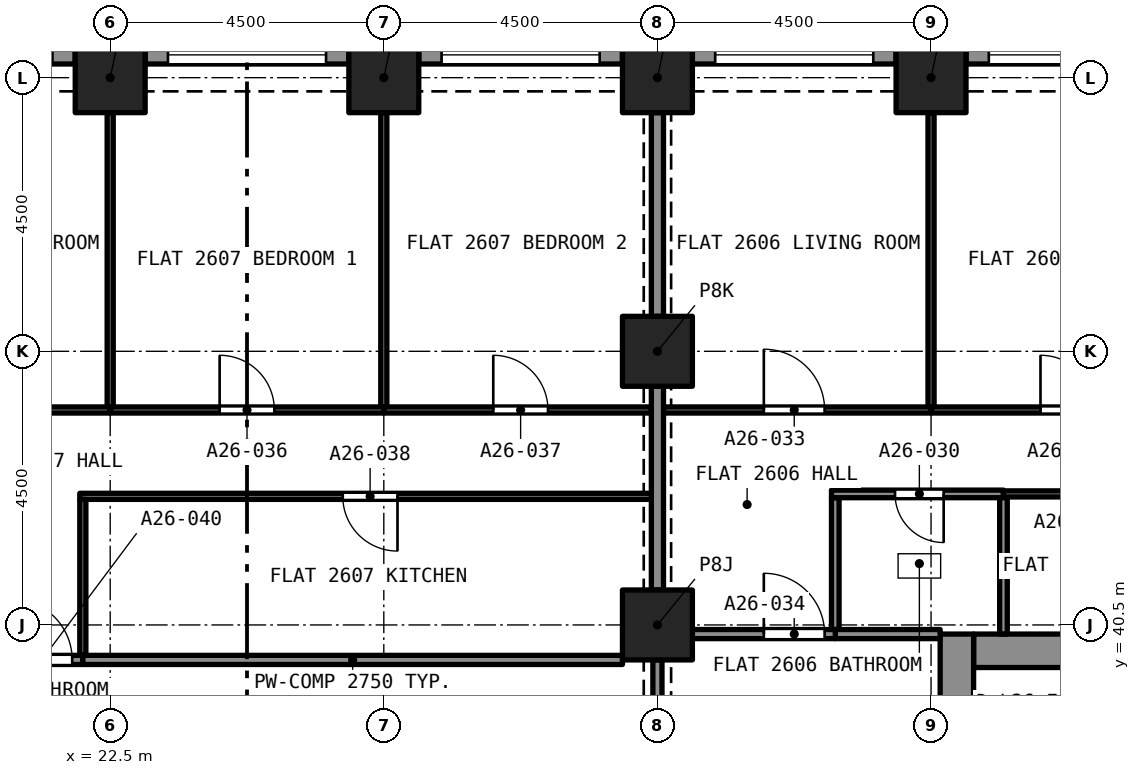
"""IFC4 building model, lengths in metres.
Left out: names, types, materials, properties, quantities, classifications, styles, units other than length and angle.
Written with IfcOpenShell. Run it as: python <this file> out.ifc"""

import sys

from ifc_helpers import new_model, si_unit, direction, frame, frame_2d, origin, origin_2d, place, context, subcontext, project, spatial, rectangle, extrude, element, fill, save


model = new_model("IFC4")
c1 = context("Model", 3, precision=1e-05, world=origin(), true_north=direction((0.0, 1.0)))
c2 = subcontext(c1, "Body", "Model", "MODEL_VIEW")
j1 = project(units=[si_unit("LENGTHUNIT", "METRE"), si_unit("PLANEANGLEUNIT", "RADIAN")], contexts=[c1])
p1 = place(None, origin())
s1 = spatial("IfcSite", under=j1, at=p1, CompositionType="ELEMENT")
p2 = place(p1, origin())
s2 = spatial("IfcBuilding", under=s1, at=p2, CompositionType="ELEMENT")
p3 = place(p2, frame((0.0, 0.0, 96.0)))
s3 = spatial("IfcBuildingStorey", under=s2, at=p3, CompositionType="ELEMENT", Elevation=96.0)
for number, where, z_axis, x_axis in (
    (1, (31.5, 40.5, 0.0), (0.0, 0.0, 1.0), (1.0, 0.0, 0.0)),
    (2, (31.5, 45.0, 0.0), (0.0, 0.0, 1.0), (1.0, 0.0, 0.0)),
    (3, (22.5, 49.5, 0.0), (0.0, 0.0, 1.0), (1.0, 0.0, 0.0)),
    (4, (27.0, 49.5, 0.0), (0.0, 0.0, 1.0), (1.0, 0.0, 0.0)),
    (5, (31.5, 49.5, 0.0), (0.0, 0.0, 1.0), (1.0, 0.0, 0.0)),
    (6, (36.0, 49.5, 0.0), (0.0, 0.0, 1.0), (1.0, 0.0, 0.0)),
):
    element("IfcColumn", number, at=place(p3, frame(where, z_axis=z_axis, x_axis=x_axis)), inside=s3, PredefinedType="COLUMN", context=c2, shape_type="SweptSolid", body=[
        extrude(rectangle(XDim=1.15, YDim=1.15, at=origin_2d()), origin(), (0.0, 0.0, 1.0), 3.2),
    ])
p4 = place(p3, frame((36.7, 40.075, 0.0), z_axis=(0.0, 0.0, 1.0), x_axis=(1.0, 0.0, 0.0)))
e7 = element("IfcWall", 7, at=p4, inside=s3, PredefinedType="SOLIDWALL", context=c2, shape_type="SweptSolid", body=[
    extrude(rectangle(XDim=7.6, YDim=0.55, at=frame_2d((3.8, 0.0))), origin(), (0.0, 0.0, 1.0), 3.2),
])
p5 = place(p3, frame((36.425, 27.15, 0.0), z_axis=(0.0, 0.0, 1.0), x_axis=(0.0, 1.0, 0.0)))
e8 = element("IfcWall", 8, at=p5, inside=s3, PredefinedType="SOLIDWALL", context=c2, shape_type="SweptSolid", body=[
    extrude(rectangle(XDim=13.2, YDim=0.55, at=frame_2d((6.6, 0.0))), origin(), (0.0, 0.0, 1.0), 3.2),
])
p6 = place(p5, frame((8.8, 0.0, 0.0)))
e9 = element("IfcOpeningElement", 9, at=p6, cuts=e8, PredefinedType="OPENING", context=c2, shape_type="SweptSolid", body=[
    extrude(rectangle(XDim=1.2, YDim=2.1, at=frame_2d((0.6, 1.05))), frame((0.0, 0.285, 0.0), z_axis=(0.0, -1.0, 0.0), x_axis=(1.0, 0.0, 0.0)), (0.0, 0.0, 1.0), 0.57),
])
p7 = place(p3, frame((36.575, 49.875, 0.0), z_axis=(0.0, 0.0, 1.0), x_axis=(1.0, 0.0, 0.0)))
e10 = element("IfcWall", 10, at=p7, inside=s3, PredefinedType="SOLIDWALL", context=c2, shape_type="SweptSolid", body=[
    extrude(rectangle(XDim=3.35, YDim=0.3, at=frame_2d((1.675, 0.0))), origin(), (0.0, 0.0, 1.0), 3.2),
])
p8 = place(p7, frame((0.375, 0.0, 0.45)))
e11 = element("IfcOpeningElement", 11, at=p8, cuts=e10, PredefinedType="OPENING", context=c2, shape_type="SweptSolid", body=[
    extrude(rectangle(XDim=2.6, YDim=1.95, at=frame_2d((1.3, 0.975))), frame((0.0, 0.16, 0.0), z_axis=(0.0, -1.0, 0.0), x_axis=(1.0, 0.0, 0.0)), (0.0, 0.0, 1.0), 0.32),
])
p9 = place(p3, frame((32.075, 49.875, 0.0), z_axis=(0.0, 0.0, 1.0), x_axis=(1.0, 0.0, 0.0)))
e12 = element("IfcWall", 12, at=p9, inside=s3, PredefinedType="SOLIDWALL", context=c2, shape_type="SweptSolid", body=[
    extrude(rectangle(XDim=3.35, YDim=0.3, at=frame_2d((1.675, 0.0))), origin(), (0.0, 0.0, 1.0), 3.2),
])
p10 = place(p9, frame((0.375, 0.0, 0.45)))
e13 = element("IfcOpeningElement", 13, at=p10, cuts=e12, PredefinedType="OPENING", context=c2, shape_type="SweptSolid", body=[
    extrude(rectangle(XDim=2.6, YDim=1.95, at=frame_2d((1.3, 0.975))), frame((0.0, 0.16, 0.0), z_axis=(0.0, -1.0, 0.0), x_axis=(1.0, 0.0, 0.0)), (0.0, 0.0, 1.0), 0.32),
])
p11 = place(p3, frame((27.575, 49.875, 0.0), z_axis=(0.0, 0.0, 1.0), x_axis=(1.0, 0.0, 0.0)))
e14 = element("IfcWall", 14, at=p11, inside=s3, PredefinedType="SOLIDWALL", context=c2, shape_type="SweptSolid", body=[
    extrude(rectangle(XDim=3.35, YDim=0.3, at=frame_2d((1.675, 0.0))), origin(), (0.0, 0.0, 1.0), 3.2),
])
p12 = place(p11, frame((0.375, 0.0, 0.45)))
e15 = element("IfcOpeningElement", 15, at=p12, cuts=e14, PredefinedType="OPENING", context=c2, shape_type="SweptSolid", body=[
    extrude(rectangle(XDim=2.6, YDim=1.95, at=frame_2d((1.3, 0.975))), frame((0.0, 0.16, 0.0), z_axis=(0.0, -1.0, 0.0), x_axis=(1.0, 0.0, 0.0)), (0.0, 0.0, 1.0), 0.32),
])
p13 = place(p3, frame((23.075, 49.875, 0.0), z_axis=(0.0, 0.0, 1.0), x_axis=(1.0, 0.0, 0.0)))
e16 = element("IfcWall", 16, at=p13, inside=s3, PredefinedType="SOLIDWALL", context=c2, shape_type="SweptSolid", body=[
    extrude(rectangle(XDim=3.35, YDim=0.3, at=frame_2d((1.675, 0.0))), origin(), (0.0, 0.0, 1.0), 3.2),
])
p14 = place(p13, frame((0.375, 0.0, 0.45)))
e17 = element("IfcOpeningElement", 17, at=p14, cuts=e16, PredefinedType="OPENING", context=c2, shape_type="SweptSolid", body=[
    extrude(rectangle(XDim=2.6, YDim=1.95, at=frame_2d((1.3, 0.975))), frame((0.0, 0.16, 0.0), z_axis=(0.0, -1.0, 0.0), x_axis=(1.0, 0.0, 0.0)), (0.0, 0.0, 1.0), 0.32),
])
p15 = place(p3, frame((18.575, 49.875, 0.0), z_axis=(0.0, 0.0, 1.0), x_axis=(1.0, 0.0, 0.0)))
e18 = element("IfcWall", 18, at=p15, inside=s3, PredefinedType="SOLIDWALL", context=c2, shape_type="SweptSolid", body=[
    extrude(rectangle(XDim=3.35, YDim=0.3, at=frame_2d((1.675, 0.0))), origin(), (0.0, 0.0, 1.0), 3.2),
])
p16 = place(p15, frame((0.375, 0.0, 0.45)))
e19 = element("IfcOpeningElement", 19, at=p16, cuts=e18, PredefinedType="OPENING", context=c2, shape_type="SweptSolid", body=[
    extrude(rectangle(XDim=2.6, YDim=1.95, at=frame_2d((1.3, 0.975))), frame((0.0, 0.16, 0.0), z_axis=(0.0, -1.0, 0.0), x_axis=(1.0, 0.0, 0.0)), (0.0, 0.0, 1.0), 0.32),
])
p17 = place(p3, frame((34.425, 40.425, 0.0), z_axis=(0.0, 0.0, 1.0), x_axis=(0.0, 1.0, 0.0)))
e20 = element("IfcWall", 20, at=p17, inside=s3, PredefinedType="PARTITIONING", context=c2, shape_type="SweptSolid", body=[
    extrude(rectangle(XDim=2.167, YDim=0.125, at=frame_2d((1.084, 0.0))), origin(), (0.0, 0.0, 1.0), 2.9),
])
p18 = place(p3, frame((37.19, 42.655, 0.0), z_axis=(0.0, 0.0, 1.0), x_axis=(-1.0, 0.0, 0.0)))
e21 = element("IfcWall", 21, at=p18, inside=s3, PredefinedType="PARTITIONING", context=c2, shape_type="SweptSolid", body=[
    extrude(rectangle(XDim=2.828, YDim=0.125, at=frame_2d((1.414, 0.0))), origin(), (0.0, 0.0, 1.0), 2.9),
])
p19 = place(p18, frame((0.983, 0.0, 0.0)))
e22 = element("IfcOpeningElement", 22, at=p19, cuts=e21, PredefinedType="OPENING", context=c2, shape_type="SweptSolid", body=[
    extrude(rectangle(XDim=0.8, YDim=2.1, at=frame_2d((0.4, 1.05))), frame((0.0, 0.073, 0.0), z_axis=(0.0, -1.0, 0.0), x_axis=(1.0, 0.0, 0.0)), (0.0, 0.0, 1.0), 0.145),
])
p20 = place(p3, frame((37.191, 40.35, 0.0), z_axis=(0.0, 0.0, 1.0), x_axis=(0.0, 1.0, 0.0)))
e23 = element("IfcWall", 23, at=p20, inside=s3, PredefinedType="PARTITIONING", context=c2, shape_type="SweptSolid", body=[
    extrude(rectangle(XDim=2.242, YDim=0.125, at=frame_2d((1.121, 0.0))), origin(), (0.0, 0.0, 1.0), 2.9),
])
p21 = place(p3, frame((34.425, 40.35, 0.0), z_axis=(0.0, 0.0, 1.0), x_axis=(1.0, 0.0, 0.0)))
e24 = element("IfcWall", 24, at=p21, inside=s3, PredefinedType="PARTITIONING", context=c2, shape_type="SweptSolid", body=[
    extrude(rectangle(XDim=1.725, YDim=0.15, at=frame_2d((0.862, 0.0))), origin(), (0.0, 0.0, 1.0), 2.9),
])
p22 = place(p3, frame((36.0, 44.035, 0.0), z_axis=(0.0, 0.0, 1.0), x_axis=(1.0, 0.0, 0.0)))
e25 = element("IfcWall", 25, at=p22, inside=s3, PredefinedType="PARTITIONING", context=c2, shape_type="SweptSolid", body=[
    extrude(rectangle(XDim=4.4, YDim=0.1, at=frame_2d((2.2, 0.0))), origin(), (0.0, 0.0, 1.0), 2.9),
])
p23 = place(p22, frame((1.8, 0.0, 0.0)))
e26 = element("IfcOpeningElement", 26, at=p23, cuts=e25, PredefinedType="OPENING", context=c2, shape_type="SweptSolid", body=[
    extrude(rectangle(XDim=0.9, YDim=2.1, at=frame_2d((0.45, 1.05))), frame((0.0, 0.06, 0.0), z_axis=(0.0, -1.0, 0.0), x_axis=(1.0, 0.0, 0.0)), (0.0, 0.0, 1.0), 0.12),
])
p24 = place(p3, frame((36.0, 44.085, 0.0), z_axis=(0.0, 0.0, 1.0), x_axis=(0.0, 1.0, 0.0)))
e27 = element("IfcWall", 27, at=p24, inside=s3, PredefinedType="PARTITIONING", context=c2, shape_type="SweptSolid", body=[
    extrude(rectangle(XDim=4.84, YDim=0.1, at=frame_2d((2.42, 0.0))), origin(), (0.0, 0.0, 1.0), 2.9),
])
p25 = place(p3, frame((40.4, 42.655, 0.0), z_axis=(0.0, 0.0, 1.0), x_axis=(-1.0, 0.0, 0.0)))
e28 = element("IfcWall", 28, at=p25, inside=s3, PredefinedType="PARTITIONING", context=c2, shape_type="SweptSolid", body=[
    extrude(rectangle(XDim=3.209, YDim=0.1, at=frame_2d((1.605, 0.0))), origin(), (0.0, 0.0, 1.0), 2.9),
])
p26 = place(p25, frame((1.105, 0.0, 0.0)))
e29 = element("IfcOpeningElement", 29, at=p26, cuts=e28, PredefinedType="OPENING", context=c2, shape_type="SweptSolid", body=[
    extrude(rectangle(XDim=0.9, YDim=2.1, at=frame_2d((0.45, 1.05))), frame((0.0, 0.06, 0.0), z_axis=(0.0, -1.0, 0.0), x_axis=(1.0, 0.0, 0.0)), (0.0, 0.0, 1.0), 0.12),
])
p27 = place(p3, frame((31.6, 44.035, 0.0), z_axis=(0.0, 0.0, 1.0), x_axis=(1.0, 0.0, 0.0)))
e30 = element("IfcWall", 30, at=p27, inside=s3, PredefinedType="PARTITIONING", context=c2, shape_type="SweptSolid", body=[
    extrude(rectangle(XDim=4.4, YDim=0.1, at=frame_2d((2.2, 0.0))), origin(), (0.0, 0.0, 1.0), 2.9),
])
p28 = place(p27, frame((1.65, 0.0, 0.0)))
e31 = element("IfcOpeningElement", 31, at=p28, cuts=e30, PredefinedType="OPENING", context=c2, shape_type="SweptSolid", body=[
    extrude(rectangle(XDim=1.0, YDim=2.1, at=frame_2d((0.5, 1.05))), frame((0.0, 0.06, 0.0), z_axis=(0.0, -1.0, 0.0), x_axis=(1.0, 0.0, 0.0)), (0.0, 0.0, 1.0), 0.12),
])
p29 = place(p3, frame((31.5, 41.075, 0.0), z_axis=(0.0, 0.0, 1.0), x_axis=(0.0, 1.0, 0.0)))
e32 = element("IfcWall", 32, at=p29, inside=s3, PredefinedType="PARTITIONING", context=c2, shape_type="SweptSolid", body=[
    extrude(rectangle(XDim=3.35, YDim=0.2, at=frame_2d((1.675, 0.0))), origin(), (0.0, 0.0, 1.0), 2.38),
])
p30 = place(p3, frame((32.075, 40.35, 0.0), z_axis=(0.0, 0.0, 1.0), x_axis=(1.0, 0.0, 0.0)))
e33 = element("IfcWall", 33, at=p30, inside=s3, PredefinedType="PARTITIONING", context=c2, shape_type="SweptSolid", body=[
    extrude(rectangle(XDim=2.35, YDim=0.15, at=frame_2d((1.175, 0.0))), origin(), (0.0, 0.0, 1.0), 2.9),
])
p31 = place(p30, frame((1.175, 0.0, 0.0)))
e34 = element("IfcOpeningElement", 34, at=p31, cuts=e33, PredefinedType="OPENING", context=c2, shape_type="SweptSolid", body=[
    extrude(rectangle(XDim=1.0, YDim=2.1, at=frame_2d((0.5, 1.05))), frame((0.0, 0.085, 0.0), z_axis=(0.0, -1.0, 0.0), x_axis=(1.0, 0.0, 0.0)), (0.0, 0.0, 1.0), 0.17),
])
p32 = place(p3, frame((31.5, 45.575, 0.0), z_axis=(0.0, 0.0, 1.0), x_axis=(0.0, 1.0, 0.0)))
e35 = element("IfcWall", 35, at=p32, inside=s3, PredefinedType="PARTITIONING", context=c2, shape_type="SweptSolid", body=[
    extrude(rectangle(XDim=3.35, YDim=0.2, at=frame_2d((1.675, 0.0))), origin(), (0.0, 0.0, 1.0), 2.38),
])
p33 = place(p3, frame((27.0, 44.085, 0.0), z_axis=(0.0, 0.0, 1.0), x_axis=(0.0, 1.0, 0.0)))
e36 = element("IfcWall", 36, at=p33, inside=s3, PredefinedType="PARTITIONING", context=c2, shape_type="SweptSolid", body=[
    extrude(rectangle(XDim=4.84, YDim=0.1, at=frame_2d((2.42, 0.0))), origin(), (0.0, 0.0, 1.0), 2.75),
])
p34 = place(p3, frame((22.5, 44.035, 0.0), z_axis=(0.0, 0.0, 1.0), x_axis=(1.0, 0.0, 0.0)))
e37 = element("IfcWall", 37, at=p34, inside=s3, PredefinedType="PARTITIONING", context=c2, shape_type="SweptSolid", body=[
    extrude(rectangle(XDim=4.5, YDim=0.1, at=frame_2d((2.25, 0.0))), origin(), (0.0, 0.0, 1.0), 2.75),
])
p35 = place(p34, frame((1.8, 0.0, 0.0)))
e38 = element("IfcOpeningElement", 38, at=p35, cuts=e37, PredefinedType="OPENING", context=c2, shape_type="SweptSolid", body=[
    extrude(rectangle(XDim=0.9, YDim=2.1, at=frame_2d((0.45, 1.05))), frame((0.0, 0.06, 0.0), z_axis=(0.0, -1.0, 0.0), x_axis=(1.0, 0.0, 0.0)), (0.0, 0.0, 1.0), 0.12),
])
p36 = place(p3, frame((22.5, 44.085, 0.0), z_axis=(0.0, 0.0, 1.0), x_axis=(0.0, 1.0, 0.0)))
e39 = element("IfcWall", 39, at=p36, inside=s3, PredefinedType="PARTITIONING", context=c2, shape_type="SweptSolid", body=[
    extrude(rectangle(XDim=4.84, YDim=0.1, at=frame_2d((2.42, 0.0))), origin(), (0.0, 0.0, 1.0), 2.75),
])
p37 = place(p3, frame((27.0, 44.035, 0.0), z_axis=(0.0, 0.0, 1.0), x_axis=(1.0, 0.0, 0.0)))
e40 = element("IfcWall", 40, at=p37, inside=s3, PredefinedType="PARTITIONING", context=c2, shape_type="SweptSolid", body=[
    extrude(rectangle(XDim=4.4, YDim=0.1, at=frame_2d((2.2, 0.0))), origin(), (0.0, 0.0, 1.0), 2.75),
])
p38 = place(p37, frame((1.8, 0.0, 0.0)))
e41 = element("IfcOpeningElement", 41, at=p38, cuts=e40, PredefinedType="OPENING", context=c2, shape_type="SweptSolid", body=[
    extrude(rectangle(XDim=0.9, YDim=2.1, at=frame_2d((0.45, 1.05))), frame((0.0, 0.06, 0.0), z_axis=(0.0, -1.0, 0.0), x_axis=(1.0, 0.0, 0.0)), (0.0, 0.0, 1.0), 0.12),
])
p39 = place(p3, frame((31.4, 42.615, 0.0), z_axis=(0.0, 0.0, 1.0), x_axis=(-1.0, 0.0, 0.0)))
e42 = element("IfcWall", 42, at=p39, inside=s3, PredefinedType="PARTITIONING", context=c2, shape_type="SweptSolid", body=[
    extrude(rectangle(XDim=9.4, YDim=0.1, at=frame_2d((4.7, 0.0))), origin(), (0.0, 0.0, 1.0), 2.75),
])
p40 = place(p39, frame((4.175, 0.0, 0.0)))
e43 = element("IfcOpeningElement", 43, at=p40, cuts=e42, PredefinedType="OPENING", context=c2, shape_type="SweptSolid", body=[
    extrude(rectangle(XDim=0.9, YDim=2.1, at=frame_2d((0.45, 1.05))), frame((0.0, 0.06, 0.0), z_axis=(0.0, -1.0, 0.0), x_axis=(1.0, 0.0, 0.0)), (0.0, 0.0, 1.0), 0.12),
])
p41 = place(p3, frame((22.05, 40.0, 0.0), z_axis=(0.0, 0.0, 1.0), x_axis=(0.0, 1.0, 0.0)))
e44 = element("IfcWall", 44, at=p41, inside=s3, PredefinedType="PARTITIONING", context=c2, shape_type="SweptSolid", body=[
    extrude(rectangle(XDim=2.565, YDim=0.1, at=frame_2d((1.282, 0.0))), origin(), (0.0, 0.0, 1.0), 2.75),
])
p42 = place(p3, frame((18.1, 44.035, 0.0), z_axis=(0.0, 0.0, 1.0), x_axis=(1.0, 0.0, 0.0)))
e45 = element("IfcWall", 45, at=p42, inside=s3, PredefinedType="PARTITIONING", context=c2, shape_type="SweptSolid", body=[
    extrude(rectangle(XDim=4.4, YDim=0.1, at=frame_2d((2.2, 0.0))), origin(), (0.0, 0.0, 1.0), 2.75),
])
p43 = place(p42, frame((1.65, 0.0, 0.0)))
e46 = element("IfcOpeningElement", 46, at=p43, cuts=e45, PredefinedType="OPENING", context=c2, shape_type="SweptSolid", body=[
    extrude(rectangle(XDim=1.0, YDim=2.1, at=frame_2d((0.5, 1.05))), frame((0.0, 0.06, 0.0), z_axis=(0.0, -1.0, 0.0), x_axis=(1.0, 0.0, 0.0)), (0.0, 0.0, 1.0), 0.12),
])
p44 = place(p3, frame((20.7, 39.925, 0.0), z_axis=(0.0, 0.0, 1.0), x_axis=(1.0, 0.0, 0.0)))
e47 = element("IfcWall", 47, at=p44, inside=s3, PredefinedType="PARTITIONING", context=c2, shape_type="SweptSolid", body=[
    extrude(rectangle(XDim=1.35, YDim=0.15, at=frame_2d((0.675, 0.0))), origin(), (0.0, 0.0, 1.0), 2.75),
])
p45 = place(p44, frame((0.175, 0.0, 0.0)))
e48 = element("IfcOpeningElement", 48, at=p45, cuts=e47, PredefinedType="OPENING", context=c2, shape_type="SweptSolid", body=[
    extrude(rectangle(XDim=1.0, YDim=2.1, at=frame_2d((0.5, 1.05))), frame((0.0, 0.085, 0.0), z_axis=(0.0, -1.0, 0.0), x_axis=(1.0, 0.0, 0.0)), (0.0, 0.0, 1.0), 0.17),
])
p46 = place(p3, frame((22.05, 39.925, 0.0), z_axis=(0.0, 0.0, 1.0), x_axis=(1.0, 0.0, 0.0)))
e49 = element("IfcWall", 49, at=p46, inside=s3, PredefinedType="PARTITIONING", context=c2, shape_type="SweptSolid", body=[
    extrude(rectangle(XDim=8.875, YDim=0.15, at=frame_2d((4.438, 0.0))), origin(), (0.0, 0.0, 1.0), 2.75),
])
p47 = place(p3, frame((31.5, 36.575, 0.0), z_axis=(0.0, 0.0, 1.0), x_axis=(0.0, 1.0, 0.0)))
e50 = element("IfcWall", 50, at=p47, inside=s3, PredefinedType="PARTITIONING", context=c2, shape_type="SweptSolid", body=[
    extrude(rectangle(XDim=3.35, YDim=0.15, at=frame_2d((1.675, 0.0))), origin(), (0.0, 0.0, 1.0), 2.38),
])
p48 = place(p47, frame((1.075, 0.0, 0.0)))
e51 = element("IfcOpeningElement", 51, at=p48, cuts=e50, PredefinedType="OPENING", context=c2, shape_type="SweptSolid", body=[
    extrude(rectangle(XDim=1.2, YDim=2.1, at=frame_2d((0.6, 1.05))), frame((0.0, 0.085, 0.0), z_axis=(0.0, -1.0, 0.0), x_axis=(1.0, 0.0, 0.0)), (0.0, 0.0, 1.0), 0.17),
])
p49 = place(p8, origin())
e52 = element("IfcWindow", 52, at=p49, inside=s3, PartitioningType="SINGLE_PANEL", PredefinedType="WINDOW", context=c2, shape_type="SweptSolid", body=[
    extrude(rectangle(XDim=2.6, YDim=1.95, at=frame_2d((1.3, 0.975))), frame((0.0, 0.03, 0.0), z_axis=(0.0, -1.0, 0.0), x_axis=(1.0, 0.0, 0.0)), (0.0, 0.0, 1.0), 0.06),
])
fill(e11, e52)
p50 = place(p10, origin())
e53 = element("IfcWindow", 53, at=p50, inside=s3, PartitioningType="SINGLE_PANEL", PredefinedType="WINDOW", context=c2, shape_type="SweptSolid", body=[
    extrude(rectangle(XDim=2.6, YDim=1.95, at=frame_2d((1.3, 0.975))), frame((0.0, 0.03, 0.0), z_axis=(0.0, -1.0, 0.0), x_axis=(1.0, 0.0, 0.0)), (0.0, 0.0, 1.0), 0.06),
])
fill(e13, e53)
p51 = place(p12, origin())
e54 = element("IfcWindow", 54, at=p51, inside=s3, PartitioningType="SINGLE_PANEL", PredefinedType="WINDOW", context=c2, shape_type="SweptSolid", body=[
    extrude(rectangle(XDim=2.6, YDim=1.95, at=frame_2d((1.3, 0.975))), frame((0.0, 0.03, 0.0), z_axis=(0.0, -1.0, 0.0), x_axis=(1.0, 0.0, 0.0)), (0.0, 0.0, 1.0), 0.06),
])
fill(e15, e54)
p52 = place(p14, origin())
e55 = element("IfcWindow", 55, at=p52, inside=s3, PartitioningType="SINGLE_PANEL", PredefinedType="WINDOW", context=c2, shape_type="SweptSolid", body=[
    extrude(rectangle(XDim=2.6, YDim=1.95, at=frame_2d((1.3, 0.975))), frame((0.0, 0.03, 0.0), z_axis=(0.0, -1.0, 0.0), x_axis=(1.0, 0.0, 0.0)), (0.0, 0.0, 1.0), 0.06),
])
fill(e17, e55)
p53 = place(p19, origin())
e56 = element("IfcDoor", 56, at=p53, inside=s3, OperationType="SINGLE_SWING_LEFT", PredefinedType="DOOR", context=c2, shape_type="SweptSolid", body=[
    extrude(rectangle(XDim=0.8, YDim=2.1, at=frame_2d((0.4, 1.05))), frame((0.0, 0.025, 0.0), z_axis=(0.0, -1.0, 0.0), x_axis=(1.0, 0.0, 0.0)), (0.0, 0.0, 1.0), 0.05),
])
fill(e22, e56)
p54 = place(p23, origin())
e57 = element("IfcDoor", 57, at=p54, inside=s3, OperationType="SINGLE_SWING_RIGHT", PredefinedType="DOOR", context=c2, shape_type="SweptSolid", body=[
    extrude(rectangle(XDim=0.9, YDim=2.1, at=frame_2d((0.45, 1.05))), frame((0.0, 0.025, 0.0), z_axis=(0.0, -1.0, 0.0), x_axis=(1.0, 0.0, 0.0)), (0.0, 0.0, 1.0), 0.05),
])
fill(e26, e57)
p55 = place(p28, origin())
e58 = element("IfcDoor", 58, at=p55, inside=s3, OperationType="SINGLE_SWING_LEFT", PredefinedType="DOOR", context=c2, shape_type="SweptSolid", body=[
    extrude(rectangle(XDim=1.0, YDim=2.1, at=frame_2d((0.5, 1.05))), frame((0.0, 0.025, 0.0), z_axis=(0.0, -1.0, 0.0), x_axis=(1.0, 0.0, 0.0)), (0.0, 0.0, 1.0), 0.05),
])
fill(e31, e58)
p56 = place(p31, origin())
e59 = element("IfcDoor", 59, at=p56, inside=s3, OperationType="SINGLE_SWING_RIGHT", PredefinedType="DOOR", context=c2, shape_type="SweptSolid", body=[
    extrude(rectangle(XDim=1.0, YDim=2.1, at=frame_2d((0.5, 1.05))), frame((0.0, 0.025, 0.0), z_axis=(0.0, -1.0, 0.0), x_axis=(1.0, 0.0, 0.0)), (0.0, 0.0, 1.0), 0.05),
])
fill(e34, e59)
p57 = place(p35, origin())
e60 = element("IfcDoor", 60, at=p57, inside=s3, OperationType="SINGLE_SWING_LEFT", PredefinedType="DOOR", context=c2, shape_type="SweptSolid", body=[
    extrude(rectangle(XDim=0.9, YDim=2.1, at=frame_2d((0.45, 1.05))), frame((0.0, 0.025, 0.0), z_axis=(0.0, -1.0, 0.0), x_axis=(1.0, 0.0, 0.0)), (0.0, 0.0, 1.0), 0.05),
])
fill(e38, e60)
p58 = place(p38, origin())
e61 = element("IfcDoor", 61, at=p58, inside=s3, OperationType="SINGLE_SWING_RIGHT", PredefinedType="DOOR", context=c2, shape_type="SweptSolid", body=[
    extrude(rectangle(XDim=0.9, YDim=2.1, at=frame_2d((0.45, 1.05))), frame((0.0, 0.025, 0.0), z_axis=(0.0, -1.0, 0.0), x_axis=(1.0, 0.0, 0.0)), (0.0, 0.0, 1.0), 0.05),
])
fill(e41, e61)
p59 = place(p40, origin())
e62 = element("IfcDoor", 62, at=p59, inside=s3, OperationType="SINGLE_SWING_LEFT", PredefinedType="DOOR", context=c2, shape_type="SweptSolid", body=[
    extrude(rectangle(XDim=0.9, YDim=2.1, at=frame_2d((0.45, 1.05))), frame((0.0, 0.025, 0.0), z_axis=(0.0, -1.0, 0.0), x_axis=(1.0, 0.0, 0.0)), (0.0, 0.0, 1.0), 0.05),
])
fill(e43, e62)
p60 = place(p45, origin())
e63 = element("IfcDoor", 63, at=p60, inside=s3, OperationType="SINGLE_SWING_RIGHT", PredefinedType="DOOR", context=c2, shape_type="SweptSolid", body=[
    extrude(rectangle(XDim=1.0, YDim=2.1, at=frame_2d((0.5, 1.05))), frame((0.0, 0.025, 0.0), z_axis=(0.0, -1.0, 0.0), x_axis=(1.0, 0.0, 0.0)), (0.0, 0.0, 1.0), 0.05),
])
fill(e48, e63)
save(model, sys.argv[1])
